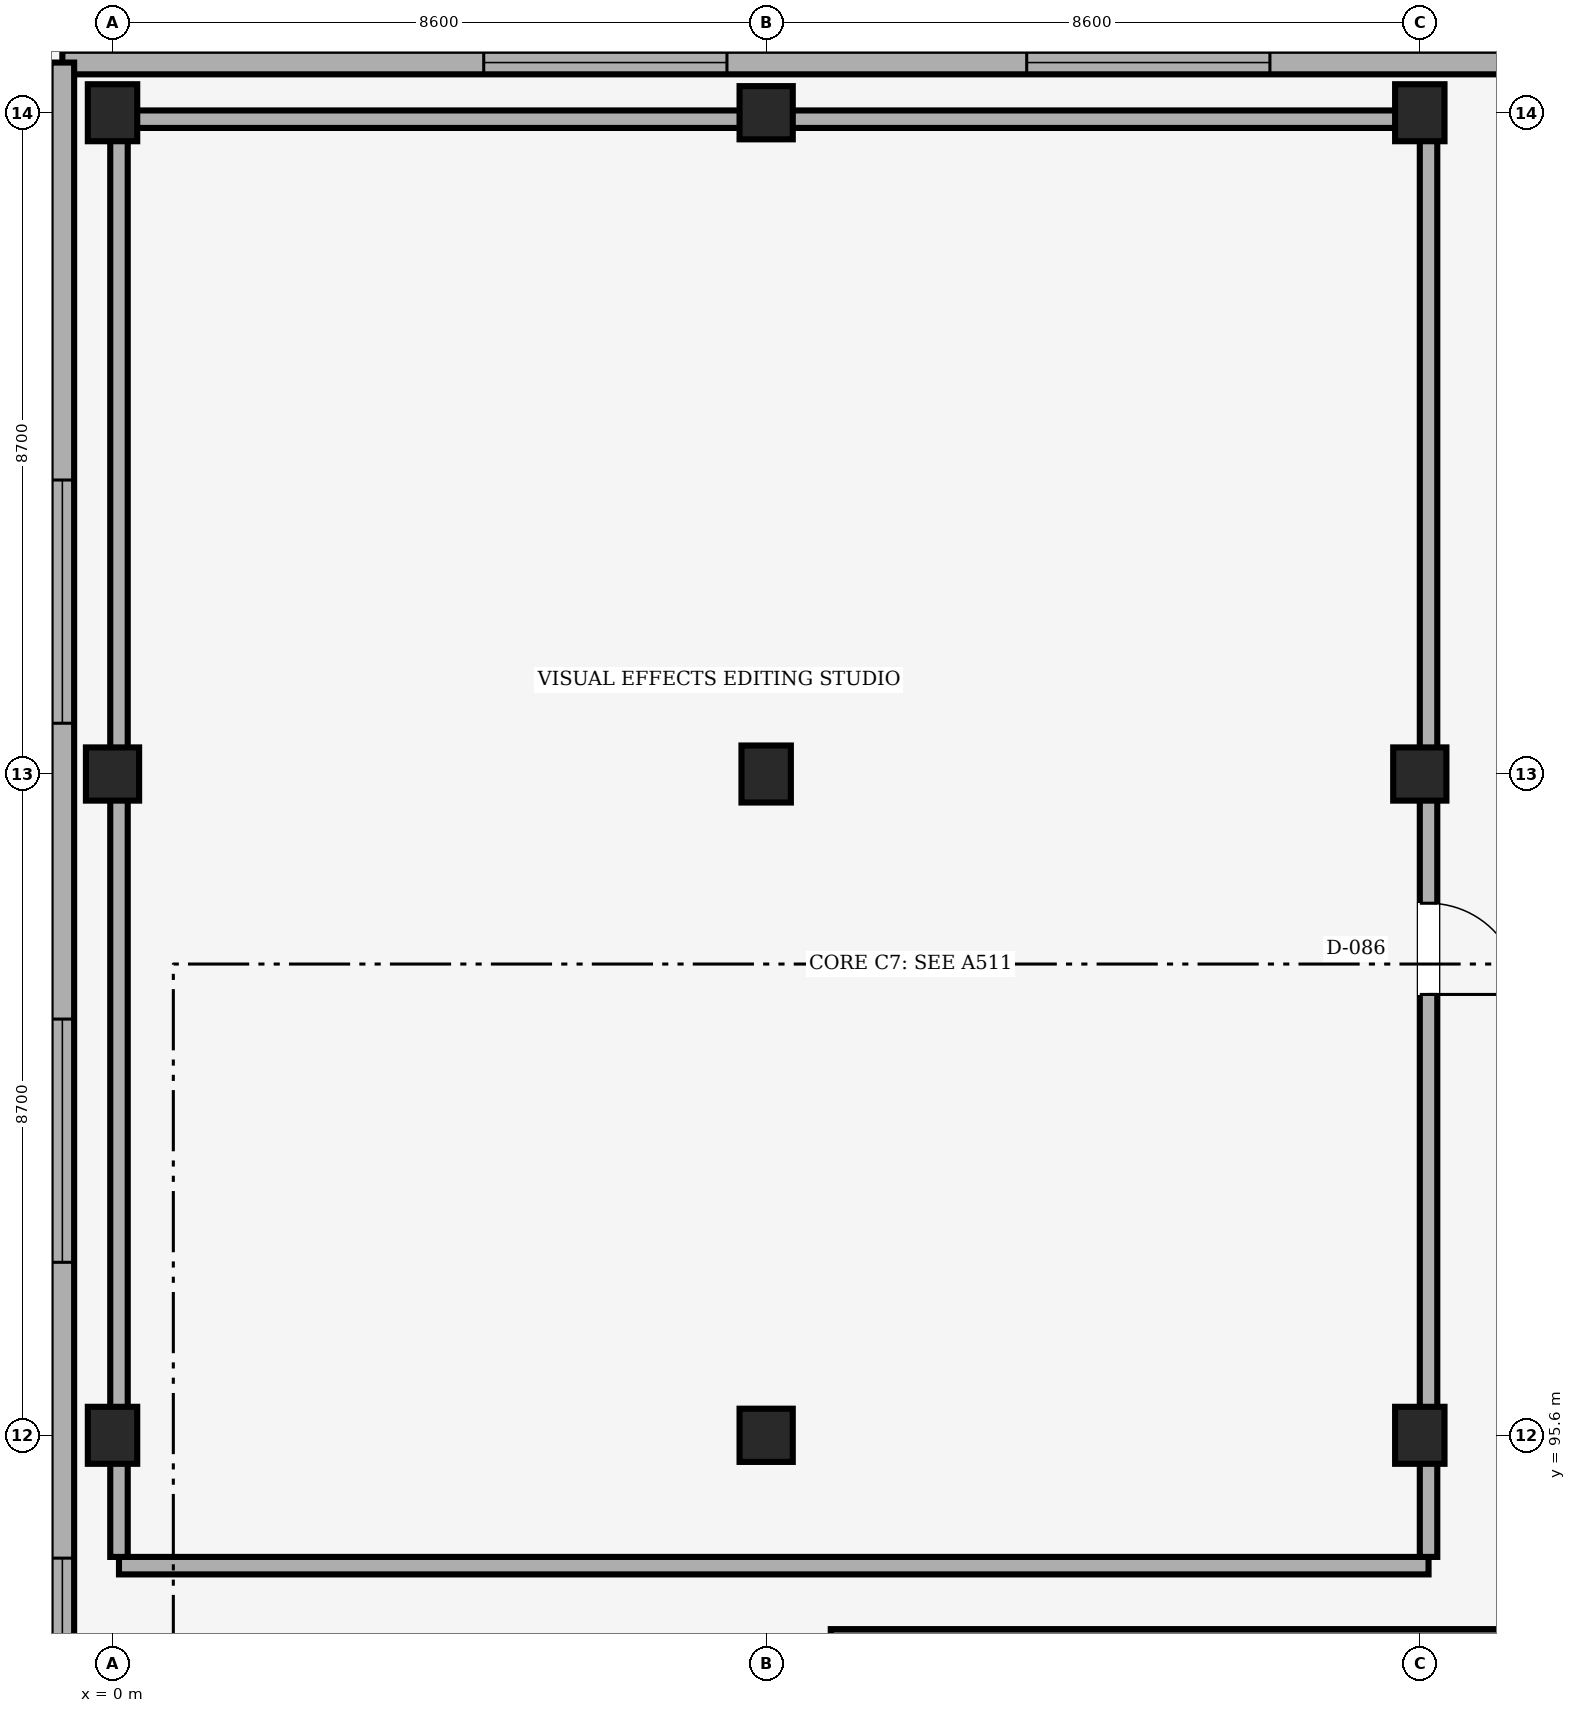
"""IFC4 building model, lengths in metres.
Left out: names, types, materials, properties, quantities, classifications, styles, units other than length and angle.
Written with IfcOpenShell. Run it as: python <this file> out.ifc"""

import sys

from ifc_helpers import new_model, si_unit, direction, frame, frame_2d, origin, origin_2d, place, context, subcontext, project, spatial, rectangle, extrude, element, fill, save


model = new_model("IFC4")
c1 = context("Model", 3, precision=1e-05, world=origin(), true_north=direction((0.0, 1.0)))
c2 = subcontext(c1, "Body", "Model", "MODEL_VIEW")
j1 = project(units=[si_unit("LENGTHUNIT", "METRE"), si_unit("PLANEANGLEUNIT", "RADIAN")], contexts=[c1])
p1 = place(None, origin())
s1 = spatial("IfcSite", under=j1, at=p1, CompositionType="ELEMENT")
p2 = place(p1, origin())
s2 = spatial("IfcBuilding", under=s1, at=p2, CompositionType="ELEMENT")
p3 = place(p2, frame((0.0, 0.0, 8.4)))
s3 = spatial("IfcBuildingStorey", under=s2, at=p3, CompositionType="ELEMENT", Elevation=8.4)
p4 = place(p3, frame((0.0, 95.6, 0.0), z_axis=(0.0, 0.0, 1.0), x_axis=(1.0, 0.0, 0.0)))
e1 = element("IfcColumn", 1, at=p4, inside=s3, PredefinedType="COLUMN", context=c2, shape_type="SweptSolid", body=[
    extrude(rectangle(XDim=0.65, YDim=0.75, at=origin_2d()), origin(), (0.0, 0.0, 1.0), 3.34),
])
p5 = place(p3, frame((0.0, 104.3, 0.0), z_axis=(0.0, 0.0, 1.0), x_axis=(1.0, 0.0, 0.0)))
e2 = element("IfcColumn", 2, at=p5, inside=s3, PredefinedType="COLUMN", context=c2, shape_type="SweptSolid", body=[
    extrude(rectangle(XDim=0.7, YDim=0.7, at=origin_2d()), origin(), (0.0, 0.0, 1.0), 3.34),
])
p6 = place(p3, frame((0.0, 113.0, 0.0), z_axis=(0.0, 0.0, 1.0), x_axis=(1.0, 0.0, 0.0)))
e3 = element("IfcColumn", 3, at=p6, inside=s3, PredefinedType="COLUMN", context=c2, shape_type="SweptSolid", body=[
    extrude(rectangle(XDim=0.65, YDim=0.75, at=origin_2d()), origin(), (0.0, 0.0, 1.0), 3.34),
])
p7 = place(p3, frame((8.6, 95.6, 0.0), z_axis=(0.0, 0.0, 1.0), x_axis=(1.0, 0.0, 0.0)))
e4 = element("IfcColumn", 4, at=p7, inside=s3, PredefinedType="COLUMN", context=c2, shape_type="SweptSolid", body=[
    extrude(rectangle(XDim=0.7, YDim=0.7, at=origin_2d()), origin(), (0.0, 0.0, 1.0), 3.34),
])
p8 = place(p3, frame((8.6, 104.3, 0.0), z_axis=(0.0, 0.0, 1.0), x_axis=(1.0, 0.0, 0.0)))
e5 = element("IfcColumn", 5, at=p8, inside=s3, PredefinedType="COLUMN", context=c2, shape_type="SweptSolid", body=[
    extrude(rectangle(XDim=0.65, YDim=0.75, at=origin_2d()), origin(), (0.0, 0.0, 1.0), 3.34),
])
p9 = place(p3, frame((8.6, 113.0, 0.0), z_axis=(0.0, 0.0, 1.0), x_axis=(1.0, 0.0, 0.0)))
e6 = element("IfcColumn", 6, at=p9, inside=s3, PredefinedType="COLUMN", context=c2, shape_type="SweptSolid", body=[
    extrude(rectangle(XDim=0.7, YDim=0.7, at=origin_2d()), origin(), (0.0, 0.0, 1.0), 3.34),
])
p10 = place(p3, frame((17.2, 95.6, 0.0), z_axis=(0.0, 0.0, 1.0), x_axis=(1.0, 0.0, 0.0)))
e7 = element("IfcColumn", 7, at=p10, inside=s3, PredefinedType="COLUMN", context=c2, shape_type="SweptSolid", body=[
    extrude(rectangle(XDim=0.65, YDim=0.75, at=origin_2d()), origin(), (0.0, 0.0, 1.0), 3.34),
])
p11 = place(p3, frame((17.2, 104.3, 0.0), z_axis=(0.0, 0.0, 1.0), x_axis=(1.0, 0.0, 0.0)))
e8 = element("IfcColumn", 8, at=p11, inside=s3, PredefinedType="COLUMN", context=c2, shape_type="SweptSolid", body=[
    extrude(rectangle(XDim=0.7, YDim=0.7, at=origin_2d()), origin(), (0.0, 0.0, 1.0), 3.34),
])
p12 = place(p3, frame((17.2, 113.0, 0.0), z_axis=(0.0, 0.0, 1.0), x_axis=(1.0, 0.0, 0.0)))
e9 = element("IfcColumn", 9, at=p12, inside=s3, PredefinedType="COLUMN", context=c2, shape_type="SweptSolid", body=[
    extrude(rectangle(XDim=0.65, YDim=0.75, at=origin_2d()), origin(), (0.0, 0.0, 1.0), 3.34),
])
p13 = place(p3, frame((-0.66, 113.66, 0.0), z_axis=(0.0, 0.0, 1.0), x_axis=(1.0, 0.0, 0.0)))
e10 = element("IfcWall", 10, at=p13, inside=s3, PredefinedType="SOLIDWALL", context=c2, shape_type="SweptSolid", body=[
    extrude(rectangle(XDim=35.72, YDim=0.31, at=frame_2d((17.86, 0.0))), origin(), (0.0, 0.0, 1.0), 3.34),
])
p14 = place(p13, frame((5.544, 0.0, 1.55)))
e11 = element("IfcOpeningElement", 11, at=p14, cuts=e10, PredefinedType="OPENING", context=c2, shape_type="SweptSolid", body=[
    extrude(rectangle(XDim=3.2, YDim=0.7, at=frame_2d((1.6, 0.35))), frame((0.0, 0.155, 0.0), z_axis=(0.0, -1.0, 0.0), x_axis=(1.0, 0.0, 0.0)), (0.0, 0.0, 1.0), 0.31),
])
p15 = place(p13, frame((12.688, 0.0, 1.55)))
e12 = element("IfcOpeningElement", 12, at=p15, cuts=e10, PredefinedType="OPENING", context=c2, shape_type="SweptSolid", body=[
    extrude(rectangle(XDim=3.2, YDim=0.7, at=frame_2d((1.6, 0.35))), frame((0.0, 0.155, 0.0), z_axis=(0.0, -1.0, 0.0), x_axis=(1.0, 0.0, 0.0)), (0.0, 0.0, 1.0), 0.31),
])
p16 = place(p13, frame((19.832, 0.0, 1.55)))
e13 = element("IfcOpeningElement", 13, at=p16, cuts=e10, PredefinedType="OPENING", context=c2, shape_type="SweptSolid", body=[
    extrude(rectangle(XDim=3.2, YDim=0.7, at=frame_2d((1.6, 0.35))), frame((0.0, 0.155, 0.0), z_axis=(0.0, -1.0, 0.0), x_axis=(1.0, 0.0, 0.0)), (0.0, 0.0, 1.0), 0.31),
])
p17 = place(p13, frame((26.976, 0.0, 1.55)))
e14 = element("IfcOpeningElement", 14, at=p17, cuts=e10, PredefinedType="OPENING", context=c2, shape_type="SweptSolid", body=[
    extrude(rectangle(XDim=3.2, YDim=0.7, at=frame_2d((1.6, 0.35))), frame((0.0, 0.155, 0.0), z_axis=(0.0, -1.0, 0.0), x_axis=(1.0, 0.0, 0.0)), (0.0, 0.0, 1.0), 0.31),
])
p18 = place(p3, frame((-0.66, 113.66, 0.0), z_axis=(0.0, 0.0, 1.0), x_axis=(0.0, -1.0, 0.0)))
e15 = element("IfcWall", 15, at=p18, inside=s3, PredefinedType="SOLIDWALL", context=c2, shape_type="SweptSolid", body=[
    extrude(rectangle(XDim=35.46, YDim=0.31, at=frame_2d((17.73, 0.0))), origin(), (0.0, 0.0, 1.0), 3.34),
])
p19 = place(p18, frame((5.492, 0.0, 1.55)))
e16 = element("IfcOpeningElement", 16, at=p19, cuts=e15, PredefinedType="OPENING", context=c2, shape_type="SweptSolid", body=[
    extrude(rectangle(XDim=3.2, YDim=0.7, at=frame_2d((1.6, 0.35))), frame((0.0, 0.155, 0.0), z_axis=(0.0, -1.0, 0.0), x_axis=(1.0, 0.0, 0.0)), (0.0, 0.0, 1.0), 0.31),
])
p20 = place(p18, frame((12.584, 0.0, 1.55)))
e17 = element("IfcOpeningElement", 17, at=p20, cuts=e15, PredefinedType="OPENING", context=c2, shape_type="SweptSolid", body=[
    extrude(rectangle(XDim=3.2, YDim=0.7, at=frame_2d((1.6, 0.35))), frame((0.0, 0.155, 0.0), z_axis=(0.0, -1.0, 0.0), x_axis=(1.0, 0.0, 0.0)), (0.0, 0.0, 1.0), 0.31),
])
p21 = place(p18, frame((19.676, 0.0, 1.55)))
e18 = element("IfcOpeningElement", 18, at=p21, cuts=e15, PredefinedType="OPENING", context=c2, shape_type="SweptSolid", body=[
    extrude(rectangle(XDim=3.2, YDim=0.7, at=frame_2d((1.6, 0.35))), frame((0.0, 0.155, 0.0), z_axis=(0.0, -1.0, 0.0), x_axis=(1.0, 0.0, 0.0)), (0.0, 0.0, 1.0), 0.31),
])
p22 = place(p18, frame((26.768, 0.0, 1.55)))
e19 = element("IfcOpeningElement", 19, at=p22, cuts=e15, PredefinedType="OPENING", context=c2, shape_type="SweptSolid", body=[
    extrude(rectangle(XDim=3.2, YDim=0.7, at=frame_2d((1.6, 0.35))), frame((0.0, 0.155, 0.0), z_axis=(0.0, -1.0, 0.0), x_axis=(1.0, 0.0, 0.0)), (0.0, 0.0, 1.0), 0.31),
])
p23 = place(p3, frame((9.45, 92.9, 0.0), z_axis=(0.0, 0.0, 1.0), x_axis=(1.0, 0.0, 0.0)))
e20 = element("IfcWall", 20, at=p23, inside=s3, PredefinedType="SHEAR", context=c2, shape_type="SweptSolid", body=[
    extrude(rectangle(XDim=10.18, YDim=0.3, at=frame_2d((5.09, 0.0))), origin(), (0.0, 0.0, 1.0), 3.34),
])
p24 = place(p3, frame((17.315, 93.885, 0.0), z_axis=(0.0, 0.0, 1.0), x_axis=(-1.0, 0.0, 0.0)))
e21 = element("IfcWall", 21, at=p24, inside=s3, PredefinedType="PARTITIONING", context=c2, shape_type="SweptSolid", body=[
    extrude(rectangle(XDim=17.23, YDim=0.23, at=frame_2d((8.615, 0.0))), origin(), (0.0, 0.0, 1.0), 3.32),
])
p25 = place(p3, frame((0.085, 94.0, 0.0), z_axis=(0.0, 0.0, 1.0), x_axis=(0.0, 1.0, 0.0)))
e22 = element("IfcWall", 22, at=p25, inside=s3, PredefinedType="PARTITIONING", context=c2, shape_type="SweptSolid", body=[
    extrude(rectangle(XDim=18.8, YDim=0.23, at=frame_2d((9.4, 0.0))), origin(), (0.0, 0.0, 1.0), 2.67),
])
p26 = place(p3, frame((0.085, 112.915, 0.0), z_axis=(0.0, 0.0, 1.0), x_axis=(1.0, 0.0, 0.0)))
e23 = element("IfcWall", 23, at=p26, inside=s3, PredefinedType="PARTITIONING", context=c2, shape_type="SweptSolid", body=[
    extrude(rectangle(XDim=17.23, YDim=0.23, at=frame_2d((8.615, 0.0))), origin(), (0.0, 0.0, 1.0), 2.72),
])
p27 = place(p3, frame((17.315, 112.8, 0.0), z_axis=(0.0, 0.0, 1.0), x_axis=(0.0, -1.0, 0.0)))
e24 = element("IfcWall", 24, at=p27, inside=s3, PredefinedType="PARTITIONING", context=c2, shape_type="SweptSolid", body=[
    extrude(rectangle(XDim=18.8, YDim=0.23, at=frame_2d((9.4, 0.0))), origin(), (0.0, 0.0, 1.0), 2.62),
])
p28 = place(p27, frame((10.2, 0.0, 0.0)))
e25 = element("IfcOpeningElement", 25, at=p28, cuts=e24, PredefinedType="OPENING", context=c2, shape_type="SweptSolid", body=[
    extrude(rectangle(XDim=1.2, YDim=2.15, at=frame_2d((0.6, 1.075))), frame((0.0, 0.115, 0.0), z_axis=(0.0, -1.0, 0.0), x_axis=(1.0, 0.0, 0.0)), (0.0, 0.0, 1.0), 0.23),
])
p29 = place(p14, origin())
e26 = element("IfcWindow", 26, at=p29, inside=s3, PartitioningType="SINGLE_PANEL", PredefinedType="WINDOW", context=c2, shape_type="SweptSolid", body=[
    extrude(rectangle(XDim=3.2, YDim=0.7, at=frame_2d((1.6, 0.35))), frame((0.0, -0.06, 0.0), z_axis=(0.0, -1.0, 0.0), x_axis=(1.0, 0.0, 0.0)), (0.0, 0.0, 1.0), 0.06),
])
fill(e11, e26)
p30 = place(p15, origin())
e27 = element("IfcWindow", 27, at=p30, inside=s3, PartitioningType="SINGLE_PANEL", PredefinedType="WINDOW", context=c2, shape_type="SweptSolid", body=[
    extrude(rectangle(XDim=3.2, YDim=0.7, at=frame_2d((1.6, 0.35))), frame((0.0, -0.06, 0.0), z_axis=(0.0, -1.0, 0.0), x_axis=(1.0, 0.0, 0.0)), (0.0, 0.0, 1.0), 0.06),
])
fill(e12, e27)
p31 = place(p19, origin())
e28 = element("IfcWindow", 28, at=p31, inside=s3, PartitioningType="SINGLE_PANEL", PredefinedType="WINDOW", context=c2, shape_type="SweptSolid", body=[
    extrude(rectangle(XDim=3.2, YDim=0.7, at=frame_2d((1.6, 0.35))), frame((0.0, -0.06, 0.0), z_axis=(0.0, -1.0, 0.0), x_axis=(1.0, 0.0, 0.0)), (0.0, 0.0, 1.0), 0.06),
])
fill(e16, e28)
p32 = place(p20, origin())
e29 = element("IfcWindow", 29, at=p32, inside=s3, PartitioningType="SINGLE_PANEL", PredefinedType="WINDOW", context=c2, shape_type="SweptSolid", body=[
    extrude(rectangle(XDim=3.2, YDim=0.7, at=frame_2d((1.6, 0.35))), frame((0.0, -0.06, 0.0), z_axis=(0.0, -1.0, 0.0), x_axis=(1.0, 0.0, 0.0)), (0.0, 0.0, 1.0), 0.06),
])
fill(e17, e29)
p33 = place(p21, origin())
e30 = element("IfcWindow", 30, at=p33, inside=s3, PartitioningType="SINGLE_PANEL", PredefinedType="WINDOW", context=c2, shape_type="SweptSolid", body=[
    extrude(rectangle(XDim=3.2, YDim=0.7, at=frame_2d((1.6, 0.35))), frame((0.0, -0.06, 0.0), z_axis=(0.0, -1.0, 0.0), x_axis=(1.0, 0.0, 0.0)), (0.0, 0.0, 1.0), 0.06),
])
fill(e18, e30)
p34 = place(p28, origin())
e31 = element("IfcDoor", 31, at=p34, inside=s3, OperationType="SINGLE_SWING_RIGHT", PredefinedType="DOOR", context=c2, shape_type="SweptSolid", body=[
    extrude(rectangle(XDim=1.2, YDim=2.15, at=frame_2d((0.6, 1.075))), frame((0.0, 0.025, 0.0), z_axis=(0.0, -1.0, 0.0), x_axis=(1.0, 0.0, 0.0)), (0.0, 0.0, 1.0), 0.05),
])
fill(e25, e31)
save(model, sys.argv[1])
